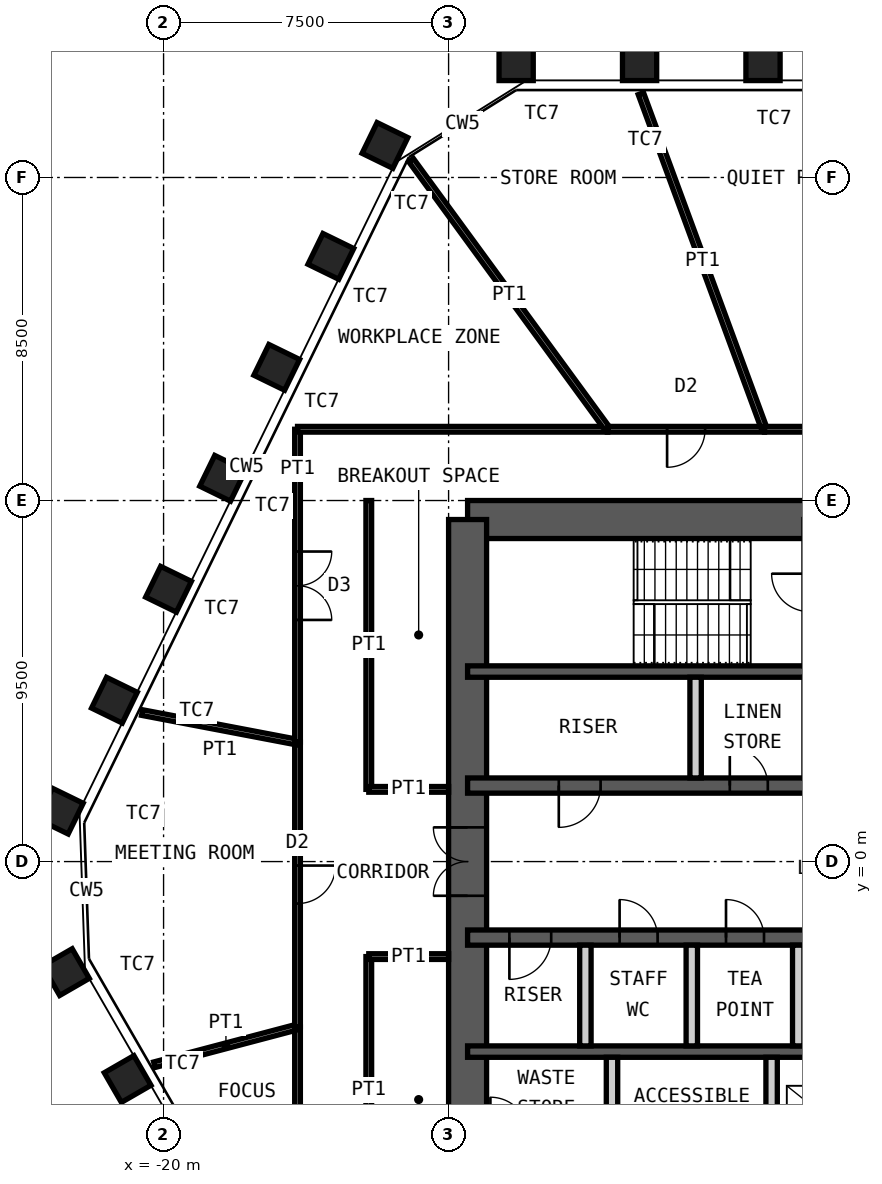
"""IFC4 building model, lengths in metres.
Left out: names, types, materials, properties, quantities, classifications, styles, units other than length and angle.
Written with IfcOpenShell. Run it as: python <this file> out.ifc"""

import sys

from ifc_helpers import new_model, si_unit, direction, frame, frame_2d, origin, origin_2d, place, context, subcontext, project, spatial, rectangle, hollow_rectangle, extrude, element, fill, save


model = new_model("IFC4")
c1 = context("Model", 3, precision=1e-05, world=origin(), true_north=direction((0.0, 1.0)))
c2 = subcontext(c1, "Body", "Model", "MODEL_VIEW")
j1 = project(units=[si_unit("LENGTHUNIT", "METRE"), si_unit("PLANEANGLEUNIT", "RADIAN")], contexts=[c1])
p1 = place(None, origin())
s1 = spatial("IfcSite", under=j1, at=p1, CompositionType="ELEMENT")
p2 = place(p1, origin())
s2 = spatial("IfcBuilding", under=s1, at=p2, CompositionType="ELEMENT")
p3 = place(p2, frame((0.0, 0.0, 274.6)))
s3 = spatial("IfcBuildingStorey", under=s2, at=p3, CompositionType="ELEMENT", Elevation=274.6)
for number, where, z_axis, x_axis in (
    (1, (-10.722, 21.0, 0.0), (0.0, 0.0, 1.0), (-1.0, 0.0, 0.0)),
    (2, (-7.474, 21.0, 0.0), (0.0, 0.0, 1.0), (-1.0, 0.0, 0.0)),
    (3, (-4.226, 21.0, 0.0), (0.0, 0.0, 1.0), (-1.0, 0.0, 0.0)),
    (4, (-20.946, -5.721, 0.0), (0.0, 0.0, 1.0), (0.5, -0.866, 0.0)),
    (5, (-22.57, -2.908, 0.0), (0.0, 0.0, 1.0), (0.5, -0.866, 0.0)),
    (6, (-22.717, 1.327, 0.0), (0.0, 0.0, 1.0), (-0.438, -0.899, 0.0)),
    (7, (-21.293, 4.246, 0.0), (0.0, 0.0, 1.0), (-0.438, -0.899, 0.0)),
    (8, (-19.87, 7.166, 0.0), (0.0, 0.0, 1.0), (-0.438, -0.899, 0.0)),
    (9, (-18.446, 10.085, 0.0), (0.0, 0.0, 1.0), (-0.438, -0.899, 0.0)),
    (10, (-17.022, 13.004, 0.0), (0.0, 0.0, 1.0), (-0.438, -0.899, 0.0)),
    (11, (-15.598, 15.924, 0.0), (0.0, 0.0, 1.0), (-0.438, -0.899, 0.0)),
    (12, (-14.174, 18.843, 0.0), (0.0, 0.0, 1.0), (-0.438, -0.899, 0.0)),
):
    element("IfcColumn", number, at=place(p3, frame(where, z_axis=z_axis, x_axis=x_axis)), inside=s3, PredefinedType="COLUMN", context=c2, shape_type="SweptSolid", body=[
        extrude(hollow_rectangle(XDim=0.9, YDim=0.9, WallThickness=0.06, at=origin_2d()), origin(), (0.0, 0.0, 1.0), 4.2),
    ])
p4 = place(p3, frame((-12.0, 9.0, 0.0), z_axis=(0.0, 0.0, 1.0), x_axis=(1.0, 0.0, 0.0)))
e13 = element("IfcWall", 13, at=p4, inside=s3, PredefinedType="SHEAR", context=c2, shape_type="SweptSolid", body=[
    extrude(rectangle(XDim=24.0, YDim=1.0, at=frame_2d((12.0, 0.0))), origin(), (0.0, 0.0, 1.0), 4.2),
])
p5 = place(p4, frame((10.4, 0.0, 0.0)))
e14 = element("IfcOpeningElement", 14, at=p5, cuts=e13, PredefinedType="OPENING", context=c2, shape_type="SweptSolid", body=[
    extrude(rectangle(XDim=1.0, YDim=2.1, at=frame_2d((0.5, 1.05))), frame((0.0, 0.51, 0.0), z_axis=(0.0, -1.0, 0.0), x_axis=(1.0, 0.0, 0.0)), (0.0, 0.0, 1.0), 1.02),
])
p6 = place(p4, frame((17.6, 0.0, 0.0)))
e15 = element("IfcOpeningElement", 15, at=p6, cuts=e13, PredefinedType="OPENING", context=c2, shape_type="SweptSolid", body=[
    extrude(rectangle(XDim=0.9, YDim=2.1, at=frame_2d((0.45, 1.05))), frame((0.0, 0.51, 0.0), z_axis=(0.0, -1.0, 0.0), x_axis=(1.0, 0.0, 0.0)), (0.0, 0.0, 1.0), 1.02),
])
p7 = place(p4, frame((21.9, 0.0, 0.0)))
e16 = element("IfcOpeningElement", 16, at=p7, cuts=e13, PredefinedType="OPENING", context=c2, shape_type="SweptSolid", body=[
    extrude(rectangle(XDim=0.9, YDim=2.1, at=frame_2d((0.45, 1.05))), frame((0.0, 0.51, 0.0), z_axis=(0.0, -1.0, 0.0), x_axis=(1.0, 0.0, 0.0)), (0.0, 0.0, 1.0), 1.02),
])
p8 = place(p3, frame((-12.0, -9.0, 0.0), z_axis=(0.0, 0.0, 1.0), x_axis=(0.0, 1.0, 0.0)))
e17 = element("IfcWall", 17, at=p8, inside=s3, PredefinedType="SHEAR", context=c2, shape_type="SweptSolid", body=[
    extrude(rectangle(XDim=18.0, YDim=1.0, at=frame_2d((9.0, 0.0))), origin(), (0.0, 0.0, 1.0), 4.2),
])
p9 = place(p8, frame((8.1, 0.0, 0.0)))
e18 = element("IfcOpeningElement", 18, at=p9, cuts=e17, PredefinedType="OPENING", context=c2, shape_type="SweptSolid", body=[
    extrude(rectangle(XDim=1.8, YDim=2.1, at=frame_2d((0.9, 1.05))), frame((0.0, 0.51, 0.0), z_axis=(0.0, -1.0, 0.0), x_axis=(1.0, 0.0, 0.0)), (0.0, 0.0, 1.0), 1.02),
])
p10 = place(p3, frame((-12.0, 5.0, 0.0), z_axis=(0.0, 0.0, 1.0), x_axis=(1.0, 0.0, 0.0)))
e19 = element("IfcWall", 19, at=p10, inside=s3, PredefinedType="SHEAR", context=c2, shape_type="SweptSolid", body=[
    extrude(rectangle(XDim=24.0, YDim=0.3, at=frame_2d((12.0, 0.0))), origin(), (0.0, 0.0, 1.0), 4.2),
])
p11 = place(p3, frame((-12.0, 2.0, 0.0), z_axis=(0.0, 0.0, 1.0), x_axis=(1.0, 0.0, 0.0)))
e20 = element("IfcWall", 20, at=p11, inside=s3, PredefinedType="SHEAR", context=c2, shape_type="SweptSolid", body=[
    extrude(rectangle(XDim=24.0, YDim=0.4, at=frame_2d((12.0, 0.0))), origin(), (0.0, 0.0, 1.0), 4.2),
])
p12 = place(p11, frame((2.4, 0.0, 0.0)))
e21 = element("IfcOpeningElement", 21, at=p12, cuts=e20, PredefinedType="OPENING", context=c2, shape_type="SweptSolid", body=[
    extrude(rectangle(XDim=1.1, YDim=2.1, at=frame_2d((0.55, 1.05))), frame((0.0, 0.21, 0.0), z_axis=(0.0, -1.0, 0.0), x_axis=(1.0, 0.0, 0.0)), (0.0, 0.0, 1.0), 0.42),
])
p13 = place(p11, frame((22.0, 0.0, 0.0)))
e22 = element("IfcOpeningElement", 22, at=p13, cuts=e20, PredefinedType="OPENING", context=c2, shape_type="SweptSolid", body=[
    extrude(rectangle(XDim=1.1, YDim=2.1, at=frame_2d((0.55, 1.05))), frame((0.0, 0.21, 0.0), z_axis=(0.0, -1.0, 0.0), x_axis=(1.0, 0.0, 0.0)), (0.0, 0.0, 1.0), 0.42),
])
p14 = place(p11, frame((10.15, 0.0, 0.0)))
e23 = element("IfcOpeningElement", 23, at=p14, cuts=e20, PredefinedType="OPENING", context=c2, shape_type="SweptSolid", body=[
    extrude(rectangle(XDim=1.0, YDim=2.1, at=frame_2d((0.5, 1.05))), frame((0.0, 0.21, 0.0), z_axis=(0.0, -1.0, 0.0), x_axis=(1.0, 0.0, 0.0)), (0.0, 0.0, 1.0), 0.42),
])
p15 = place(p11, frame((6.9, 0.0, 0.0)))
e24 = element("IfcOpeningElement", 24, at=p15, cuts=e20, PredefinedType="OPENING", context=c2, shape_type="SweptSolid", body=[
    extrude(rectangle(XDim=1.0, YDim=2.1, at=frame_2d((0.5, 1.05))), frame((0.0, 0.21, 0.0), z_axis=(0.0, -1.0, 0.0), x_axis=(1.0, 0.0, 0.0)), (0.0, 0.0, 1.0), 0.42),
])
p16 = place(p11, frame((13.35, 0.0, 0.0)))
e25 = element("IfcOpeningElement", 25, at=p16, cuts=e20, PredefinedType="OPENING", context=c2, shape_type="SweptSolid", body=[
    extrude(rectangle(XDim=1.1, YDim=2.4, at=frame_2d((0.55, 1.2))), frame((0.0, 0.21, 0.0), z_axis=(0.0, -1.0, 0.0), x_axis=(1.0, 0.0, 0.0)), (0.0, 0.0, 1.0), 0.42),
])
p17 = place(p11, frame((16.15, 0.0, 0.0)))
e26 = element("IfcOpeningElement", 26, at=p17, cuts=e20, PredefinedType="OPENING", context=c2, shape_type="SweptSolid", body=[
    extrude(rectangle(XDim=1.1, YDim=2.4, at=frame_2d((0.55, 1.2))), frame((0.0, 0.21, 0.0), z_axis=(0.0, -1.0, 0.0), x_axis=(1.0, 0.0, 0.0)), (0.0, 0.0, 1.0), 0.42),
])
p18 = place(p11, frame((19.0, 0.0, 0.0)))
e27 = element("IfcOpeningElement", 27, at=p18, cuts=e20, PredefinedType="OPENING", context=c2, shape_type="SweptSolid", body=[
    extrude(rectangle(XDim=1.0, YDim=2.1, at=frame_2d((0.5, 1.05))), frame((0.0, 0.21, 0.0), z_axis=(0.0, -1.0, 0.0), x_axis=(1.0, 0.0, 0.0)), (0.0, 0.0, 1.0), 0.42),
])
p19 = place(p3, frame((-12.0, -2.0, 0.0), z_axis=(0.0, 0.0, 1.0), x_axis=(1.0, 0.0, 0.0)))
e28 = element("IfcWall", 28, at=p19, inside=s3, PredefinedType="SHEAR", context=c2, shape_type="SweptSolid", body=[
    extrude(rectangle(XDim=24.0, YDim=0.4, at=frame_2d((12.0, 0.0))), origin(), (0.0, 0.0, 1.0), 4.2),
])
p20 = place(p19, frame((1.1, 0.0, 0.0)))
e29 = element("IfcOpeningElement", 29, at=p20, cuts=e28, PredefinedType="OPENING", context=c2, shape_type="SweptSolid", body=[
    extrude(rectangle(XDim=1.1, YDim=2.1, at=frame_2d((0.55, 1.05))), frame((0.0, 0.21, 0.0), z_axis=(0.0, -1.0, 0.0), x_axis=(1.0, 0.0, 0.0)), (0.0, 0.0, 1.0), 0.42),
])
p21 = place(p19, frame((13.55, 0.0, 0.0)))
e30 = element("IfcOpeningElement", 30, at=p21, cuts=e28, PredefinedType="OPENING", context=c2, shape_type="SweptSolid", body=[
    extrude(rectangle(XDim=1.1, YDim=2.1, at=frame_2d((0.55, 1.05))), frame((0.0, 0.21, 0.0), z_axis=(0.0, -1.0, 0.0), x_axis=(1.0, 0.0, 0.0)), (0.0, 0.0, 1.0), 0.42),
])
p22 = place(p19, frame((20.7, 0.0, 0.0)))
e31 = element("IfcOpeningElement", 31, at=p22, cuts=e28, PredefinedType="OPENING", context=c2, shape_type="SweptSolid", body=[
    extrude(rectangle(XDim=1.1, YDim=2.1, at=frame_2d((0.55, 1.05))), frame((0.0, 0.21, 0.0), z_axis=(0.0, -1.0, 0.0), x_axis=(1.0, 0.0, 0.0)), (0.0, 0.0, 1.0), 0.42),
])
p23 = place(p19, frame((4.0, 0.0, 0.0)))
e32 = element("IfcOpeningElement", 32, at=p23, cuts=e28, PredefinedType="OPENING", context=c2, shape_type="SweptSolid", body=[
    extrude(rectangle(XDim=1.0, YDim=2.1, at=frame_2d((0.5, 1.05))), frame((0.0, 0.21, 0.0), z_axis=(0.0, -1.0, 0.0), x_axis=(1.0, 0.0, 0.0)), (0.0, 0.0, 1.0), 0.42),
])
p24 = place(p19, frame((6.8, 0.0, 0.0)))
e33 = element("IfcOpeningElement", 33, at=p24, cuts=e28, PredefinedType="OPENING", context=c2, shape_type="SweptSolid", body=[
    extrude(rectangle(XDim=1.0, YDim=2.1, at=frame_2d((0.5, 1.05))), frame((0.0, 0.21, 0.0), z_axis=(0.0, -1.0, 0.0), x_axis=(1.0, 0.0, 0.0)), (0.0, 0.0, 1.0), 0.42),
])
p25 = place(p19, frame((9.6, 0.0, 0.0)))
e34 = element("IfcOpeningElement", 34, at=p25, cuts=e28, PredefinedType="OPENING", context=c2, shape_type="SweptSolid", body=[
    extrude(rectangle(XDim=1.0, YDim=2.1, at=frame_2d((0.5, 1.05))), frame((0.0, 0.21, 0.0), z_axis=(0.0, -1.0, 0.0), x_axis=(1.0, 0.0, 0.0)), (0.0, 0.0, 1.0), 0.42),
])
p26 = place(p3, frame((-12.0, -5.0, 0.0), z_axis=(0.0, 0.0, 1.0), x_axis=(1.0, 0.0, 0.0)))
e35 = element("IfcWall", 35, at=p26, inside=s3, PredefinedType="SHEAR", context=c2, shape_type="SweptSolid", body=[
    extrude(rectangle(XDim=24.0, YDim=0.3, at=frame_2d((12.0, 0.0))), origin(), (0.0, 0.0, 1.0), 4.2),
])
for number, where, z_axis, x_axis in (
    (36, (-6.0, 2.2, 0.0), (0.0, 0.0, 1.0), (0.0, 1.0, 0.0)),
    (37, (-8.9, -4.85, 0.0), (0.0, 0.0, 1.0), (0.0, 1.0, 0.0)),
    (38, (-6.1, -4.85, 0.0), (0.0, 0.0, 1.0), (0.0, 1.0, 0.0)),
    (39, (-3.3, -4.85, 0.0), (0.0, 0.0, 1.0), (0.0, 1.0, 0.0)),
):
    element("IfcWall", number, at=place(p3, frame(where, z_axis=z_axis, x_axis=x_axis)), inside=s3, PredefinedType="PARTITIONING", context=c2, shape_type="SweptSolid", body=[
        extrude(rectangle(XDim=2.65, YDim=0.3, at=frame_2d((1.325, 0.0))), origin(), (0.0, 0.0, 1.0), 3.98),
    ])
for number, where, z_axis, x_axis in (
    (40, (-8.2, -9.0, 0.0), (0.0, 0.0, 1.0), (0.0, 1.0, 0.0)),
    (41, (-4.0, -9.0, 0.0), (0.0, 0.0, 1.0), (0.0, 1.0, 0.0)),
):
    element("IfcWall", number, at=place(p3, frame(where, z_axis=z_axis, x_axis=x_axis)), inside=s3, PredefinedType="PARTITIONING", context=c2, shape_type="SweptSolid", body=[
        extrude(rectangle(XDim=3.85, YDim=0.3, at=frame_2d((1.925, 0.0))), origin(), (0.0, 0.0, 1.0), 3.98),
    ])
p27 = place(p3, frame((-16.475, -10.601, 0.0), z_axis=(0.0, 0.0, 1.0), x_axis=(0.0, 1.0, 0.0)))
e42 = element("IfcWall", 42, at=p27, inside=s3, PredefinedType="PARTITIONING", context=c2, shape_type="SweptSolid", body=[
    extrude(rectangle(XDim=6.25, YDim=0.15, at=frame_2d((3.125, 0.0))), origin(), (0.0, 0.0, 1.0), 4.03),
])
p28 = place(p27, frame((2.625, 0.0, 0.0)))
e43 = element("IfcOpeningElement", 43, at=p28, cuts=e42, PredefinedType="OPENING", context=c2, shape_type="SweptSolid", body=[
    extrude(rectangle(XDim=1.0, YDim=2.4, at=frame_2d((0.5, 1.2))), frame((0.0, 0.085, 0.0), z_axis=(0.0, -1.0, 0.0), x_axis=(1.0, 0.0, 0.0)), (0.0, 0.0, 1.0), 0.17),
])
p29 = place(p3, frame((-20.243, -5.346, 0.0), z_axis=(0.0, 0.0, 1.0), x_axis=(0.966843659694, 0.25536902261, 0.0)))
e44 = element("IfcWall", 44, at=p29, inside=s3, PredefinedType="PARTITIONING", context=c2, shape_type="SweptSolid", body=[
    extrude(rectangle(XDim=3.897, YDim=0.15, at=frame_2d((1.948, 0.0))), origin(), (0.0, 0.0, 1.0), 3.33),
])
p30 = place(p3, frame((-16.475, -4.351, 0.0), z_axis=(0.0, 0.0, 1.0), x_axis=(0.0, 1.0, 0.0)))
e45 = element("IfcWall", 45, at=p30, inside=s3, PredefinedType="PARTITIONING", context=c2, shape_type="SweptSolid", body=[
    extrude(rectangle(XDim=7.492, YDim=0.15, at=frame_2d((3.746, 0.0))), origin(), (0.0, 0.0, 1.0), 4.03),
])
p31 = place(p30, frame((3.246, 0.0, 0.0)))
e46 = element("IfcOpeningElement", 46, at=p31, cuts=e45, PredefinedType="OPENING", context=c2, shape_type="SweptSolid", body=[
    extrude(rectangle(XDim=1.0, YDim=2.4, at=frame_2d((0.5, 1.2))), frame((0.0, 0.085, 0.0), z_axis=(0.0, -1.0, 0.0), x_axis=(1.0, 0.0, 0.0)), (0.0, 0.0, 1.0), 0.17),
])
p32 = place(p3, frame((-20.566, 3.921, 0.0), z_axis=(0.0, 0.0, 1.0), x_axis=(0.982304172816, -0.187292584123, 0.0)))
e47 = element("IfcWall", 47, at=p32, inside=s3, PredefinedType="PARTITIONING", context=c2, shape_type="SweptSolid", body=[
    extrude(rectangle(XDim=4.165, YDim=0.15, at=frame_2d((2.083, 0.0))), origin(), (0.0, 0.0, 1.0), 3.33),
])
p33 = place(p3, frame((-16.475, 3.141, 0.0), z_axis=(0.0, 0.0, 1.0), x_axis=(0.0, 1.0, 0.0)))
e48 = element("IfcWall", 48, at=p33, inside=s3, PredefinedType="PARTITIONING", context=c2, shape_type="SweptSolid", body=[
    extrude(rectangle(XDim=8.234, YDim=0.15, at=frame_2d((4.117, 0.0))), origin(), (0.0, 0.0, 1.0), 4.03),
])
p34 = place(p33, frame((3.217, 0.0, 0.0)))
e49 = element("IfcOpeningElement", 49, at=p34, cuts=e48, PredefinedType="OPENING", context=c2, shape_type="SweptSolid", body=[
    extrude(rectangle(XDim=1.8, YDim=2.4, at=frame_2d((0.9, 1.2))), frame((0.0, 0.085, 0.0), z_axis=(0.0, -1.0, 0.0), x_axis=(1.0, 0.0, 0.0)), (0.0, 0.0, 1.0), 0.17),
])
p35 = place(p3, frame((-16.475, 11.375, 0.0), z_axis=(0.0, 0.0, 1.0), x_axis=(1.0, 0.0, 0.0)))
e50 = element("IfcWall", 50, at=p35, inside=s3, PredefinedType="PARTITIONING", context=c2, shape_type="SweptSolid", body=[
    extrude(rectangle(XDim=8.163, YDim=0.15, at=frame_2d((4.082, 0.0))), origin(), (0.0, 0.0, 1.0), 4.03),
])
p36 = place(p3, frame((-13.486, 18.455, 0.0), z_axis=(0.0, 0.0, 1.0), x_axis=(0.589997742419, -0.807404894672, 0.0)))
e51 = element("IfcWall", 51, at=p36, inside=s3, PredefinedType="PARTITIONING", context=c2, shape_type="SweptSolid", body=[
    extrude(rectangle(XDim=8.769, YDim=0.15, at=frame_2d((4.385, 0.0))), origin(), (0.0, 0.0, 1.0), 2.93),
])
p37 = place(p3, frame((-8.312, 11.375, 0.0), z_axis=(0.0, 0.0, 1.0), x_axis=(1.0, 0.0, 0.0)))
e52 = element("IfcWall", 52, at=p37, inside=s3, PredefinedType="PARTITIONING", context=c2, shape_type="SweptSolid", body=[
    extrude(rectangle(XDim=4.124, YDim=0.15, at=frame_2d((2.062, 0.0))), origin(), (0.0, 0.0, 1.0), 4.03),
])
p38 = place(p37, frame((1.562, 0.0, 0.0)))
e53 = element("IfcOpeningElement", 53, at=p38, cuts=e52, PredefinedType="OPENING", context=c2, shape_type="SweptSolid", body=[
    extrude(rectangle(XDim=1.0, YDim=2.4, at=frame_2d((0.5, 1.2))), frame((0.0, 0.085, 0.0), z_axis=(0.0, -1.0, 0.0), x_axis=(1.0, 0.0, 0.0)), (0.0, 0.0, 1.0), 0.17),
])
p39 = place(p3, frame((-7.44, 20.206, 0.0), z_axis=(0.0, 0.0, 1.0), x_axis=(0.345510588088, -0.938414851502, 0.0)))
e54 = element("IfcWall", 54, at=p39, inside=s3, PredefinedType="PARTITIONING", context=c2, shape_type="SweptSolid", body=[
    extrude(rectangle(XDim=9.411, YDim=0.15, at=frame_2d((4.705, 0.0))), origin(), (0.0, 0.0, 1.0), 3.33),
])
p40 = place(p3, frame((-4.188, 11.375, 0.0), z_axis=(0.0, 0.0, 1.0), x_axis=(1.0, 0.0, 0.0)))
e55 = element("IfcWall", 55, at=p40, inside=s3, PredefinedType="PARTITIONING", context=c2, shape_type="SweptSolid", body=[
    extrude(rectangle(XDim=3.64, YDim=0.15, at=frame_2d((1.82, 0.0))), origin(), (0.0, 0.0, 1.0), 4.03),
])
p41 = place(p40, frame((1.32, 0.0, 0.0)))
e56 = element("IfcOpeningElement", 56, at=p41, cuts=e55, PredefinedType="OPENING", context=c2, shape_type="SweptSolid", body=[
    extrude(rectangle(XDim=1.0, YDim=2.4, at=frame_2d((0.5, 1.2))), frame((0.0, 0.085, 0.0), z_axis=(0.0, -1.0, 0.0), x_axis=(1.0, 0.0, 0.0)), (0.0, 0.0, 1.0), 0.17),
])
p42 = place(p3, frame((-14.6, 1.9, 0.0), z_axis=(0.0, 0.0, 1.0), x_axis=(0.0, 1.0, 0.0)))
e57 = element("IfcWall", 57, at=p42, inside=s3, PredefinedType="PARTITIONING", context=c2, shape_type="SweptSolid", body=[
    extrude(rectangle(XDim=7.6, YDim=0.15, at=frame_2d((3.8, 0.0))), origin(), (0.0, 0.0, 1.0), 4.03),
])
p43 = place(p3, frame((-12.5, 1.9, 0.0), z_axis=(0.0, 0.0, 1.0), x_axis=(-1.0, 0.0, 0.0)))
e58 = element("IfcWall", 58, at=p43, inside=s3, PredefinedType="PARTITIONING", context=c2, shape_type="SweptSolid", body=[
    extrude(rectangle(XDim=2.1, YDim=0.15, at=frame_2d((1.05, 0.0))), origin(), (0.0, 0.0, 1.0), 3.53),
])
p44 = place(p3, frame((-14.6, -9.5, 0.0), z_axis=(0.0, 0.0, 1.0), x_axis=(0.0, 1.0, 0.0)))
e59 = element("IfcWall", 59, at=p44, inside=s3, PredefinedType="PARTITIONING", context=c2, shape_type="SweptSolid", body=[
    extrude(rectangle(XDim=7.0, YDim=0.15, at=frame_2d((3.5, 0.0))), origin(), (0.0, 0.0, 1.0), 4.03),
])
p45 = place(p3, frame((-12.5, -2.5, 0.0), z_axis=(0.0, 0.0, 1.0), x_axis=(-1.0, 0.0, 0.0)))
e60 = element("IfcWall", 60, at=p45, inside=s3, PredefinedType="PARTITIONING", context=c2, shape_type="SweptSolid", body=[
    extrude(rectangle(XDim=2.1, YDim=0.15, at=frame_2d((1.05, 0.0))), origin(), (0.0, 0.0, 1.0), 3.53),
])
p46 = place(p12, origin())
e61 = element("IfcDoor", 61, at=p46, inside=s3, OperationType="SINGLE_SWING_LEFT", PredefinedType="DOOR", context=c2, shape_type="SweptSolid", body=[
    extrude(rectangle(XDim=1.1, YDim=2.1, at=frame_2d((0.55, 1.05))), frame((0.0, 0.025, 0.0), z_axis=(0.0, -1.0, 0.0), x_axis=(1.0, 0.0, 0.0)), (0.0, 0.0, 1.0), 0.05),
])
fill(e21, e61)
p47 = place(p20, origin())
e62 = element("IfcDoor", 62, at=p47, inside=s3, OperationType="SINGLE_SWING_LEFT", PredefinedType="DOOR", context=c2, shape_type="SweptSolid", body=[
    extrude(rectangle(XDim=1.1, YDim=2.1, at=frame_2d((0.55, 1.05))), frame((0.0, 0.025, 0.0), z_axis=(0.0, -1.0, 0.0), x_axis=(1.0, 0.0, 0.0)), (0.0, 0.0, 1.0), 0.05),
])
fill(e29, e62)
p48 = place(p9, origin())
e63 = element("IfcDoor", 63, at=p48, inside=s3, OperationType="DOUBLE_DOOR_DOUBLE_SWING", PredefinedType="DOOR", context=c2, shape_type="SweptSolid", body=[
    extrude(rectangle(XDim=1.8, YDim=2.1, at=frame_2d((0.9, 1.05))), frame((0.0, 0.025, 0.0), z_axis=(0.0, -1.0, 0.0), x_axis=(1.0, 0.0, 0.0)), (0.0, 0.0, 1.0), 0.05),
])
fill(e18, e63)
p49 = place(p15, origin())
e64 = element("IfcDoor", 64, at=p49, inside=s3, OperationType="SINGLE_SWING_RIGHT", PredefinedType="DOOR", context=c2, shape_type="SweptSolid", body=[
    extrude(rectangle(XDim=1.0, YDim=2.1, at=frame_2d((0.5, 1.05))), frame((0.0, 0.025, 0.0), z_axis=(0.0, -1.0, 0.0), x_axis=(1.0, 0.0, 0.0)), (0.0, 0.0, 1.0), 0.05),
])
fill(e24, e64)
p50 = place(p23, origin())
e65 = element("IfcDoor", 65, at=p50, inside=s3, OperationType="SINGLE_SWING_RIGHT", PredefinedType="DOOR", context=c2, shape_type="SweptSolid", body=[
    extrude(rectangle(XDim=1.0, YDim=2.1, at=frame_2d((0.5, 1.05))), frame((0.0, 0.025, 0.0), z_axis=(0.0, -1.0, 0.0), x_axis=(1.0, 0.0, 0.0)), (0.0, 0.0, 1.0), 0.05),
])
fill(e32, e65)
p51 = place(p24, origin())
e66 = element("IfcDoor", 66, at=p51, inside=s3, OperationType="SINGLE_SWING_RIGHT", PredefinedType="DOOR", context=c2, shape_type="SweptSolid", body=[
    extrude(rectangle(XDim=1.0, YDim=2.1, at=frame_2d((0.5, 1.05))), frame((0.0, 0.025, 0.0), z_axis=(0.0, -1.0, 0.0), x_axis=(1.0, 0.0, 0.0)), (0.0, 0.0, 1.0), 0.05),
])
fill(e33, e66)
p52 = place(p31, origin())
e67 = element("IfcDoor", 67, at=p52, inside=s3, OperationType="SINGLE_SWING_RIGHT", PredefinedType="DOOR", context=c2, shape_type="SweptSolid", body=[
    extrude(rectangle(XDim=1.0, YDim=2.4, at=frame_2d((0.5, 1.2))), frame((0.0, 0.025, 0.0), z_axis=(0.0, -1.0, 0.0), x_axis=(1.0, 0.0, 0.0)), (0.0, 0.0, 1.0), 0.05),
])
fill(e46, e67)
p53 = place(p34, origin())
e68 = element("IfcDoor", 68, at=p53, inside=s3, OperationType="DOUBLE_DOOR_DOUBLE_SWING", PredefinedType="DOOR", context=c2, shape_type="SweptSolid", body=[
    extrude(rectangle(XDim=1.8, YDim=2.4, at=frame_2d((0.9, 1.2))), frame((0.0, 0.025, 0.0), z_axis=(0.0, -1.0, 0.0), x_axis=(1.0, 0.0, 0.0)), (0.0, 0.0, 1.0), 0.05),
])
fill(e49, e68)
p54 = place(p38, origin())
e69 = element("IfcDoor", 69, at=p54, inside=s3, OperationType="SINGLE_SWING_LEFT", PredefinedType="DOOR", context=c2, shape_type="SweptSolid", body=[
    extrude(rectangle(XDim=1.0, YDim=2.4, at=frame_2d((0.5, 1.2))), frame((0.0, 0.025, 0.0), z_axis=(0.0, -1.0, 0.0), x_axis=(1.0, 0.0, 0.0)), (0.0, 0.0, 1.0), 0.05),
])
fill(e53, e69)
save(model, sys.argv[1])
